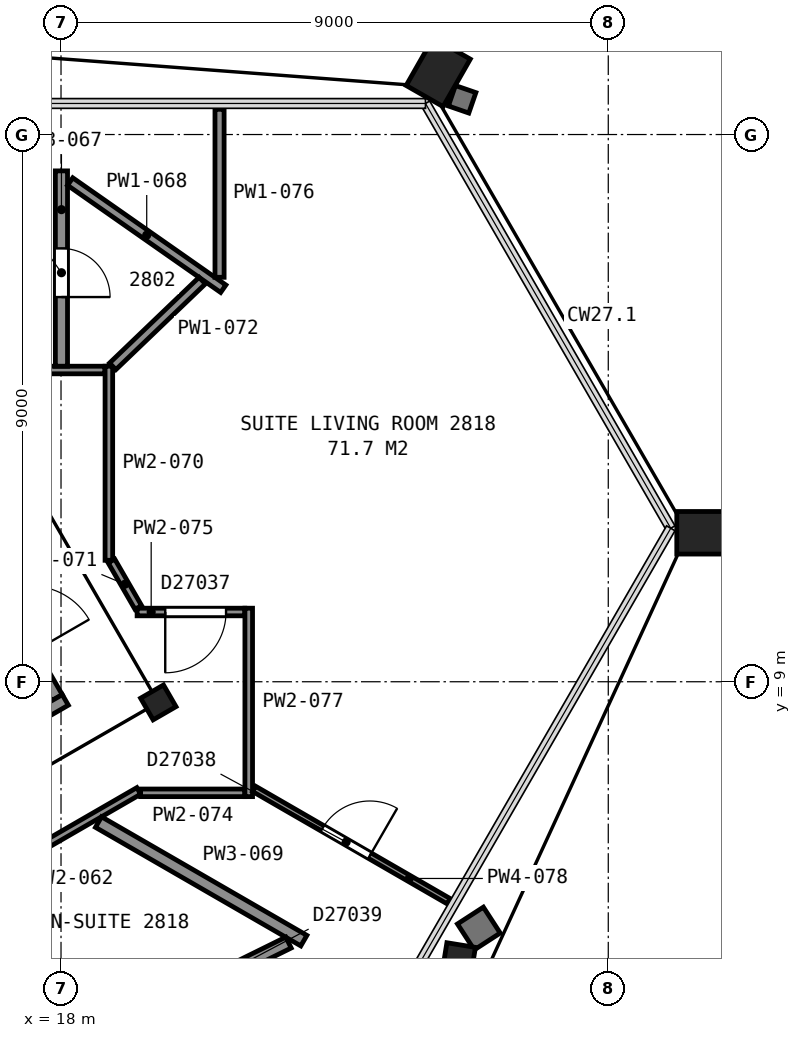
"""IFC4 building model, lengths in metres.
Left out: names, types, materials, properties, quantities, classifications, styles, units other than length and angle.
Written with IfcOpenShell. Run it as: python <this file> out.ifc"""

import sys

from ifc_helpers import new_model, si_unit, direction, frame, frame_2d, origin, origin_2d, place, context, subcontext, project, spatial, rectangle, hollow_rectangle, i_section, extrude, element, fill, save


model = new_model("IFC4")
c1 = context("Model", 3, precision=1e-05, world=origin(), true_north=direction((0.0, 1.0)))
c2 = subcontext(c1, "Body", "Model", "MODEL_VIEW")
j1 = project(units=[si_unit("LENGTHUNIT", "METRE"), si_unit("PLANEANGLEUNIT", "RADIAN")], contexts=[c1])
p1 = place(None, origin())
s1 = spatial("IfcSite", under=j1, at=p1, CompositionType="ELEMENT")
p2 = place(p1, origin())
s2 = spatial("IfcBuilding", under=s1, at=p2, CompositionType="ELEMENT")
p3 = place(p2, frame((0.0, 0.0, 118.0)))
s3 = spatial("IfcBuildingStorey", under=s2, at=p3, CompositionType="ELEMENT", Elevation=118.0)
p4 = place(p3, frame((24.078, 18.805, 0.075), z_axis=(0.108418777699, 0.189698332699, 0.975838055834), x_axis=(0.496777298599, -0.860607291206, 0.112104442017)))
e1 = element("IfcColumn", 1, at=p4, inside=s3, PredefinedType="COLUMN", context=c2, shape_type="SweptSolid", body=[
    extrude(hollow_rectangle(XDim=0.7, YDim=0.9, WallThickness=0.065, at=origin_2d()), origin(), (0.0, 0.0, 1.0), 3.535),
])
p5 = place(p3, frame((24.309, 4.499, 0.045), z_axis=(0.20122090252, -0.032617533776, 0.979002678689), x_axis=(-0.49858735319, -0.863700568811, 0.073701958421)))
e2 = element("IfcColumn", 2, at=p5, inside=s3, PredefinedType="COLUMN", context=c2, shape_type="SweptSolid", body=[
    extrude(i_section(OverallWidth=0.424, OverallDepth=0.475, WebThickness=0.048, FlangeThickness=0.077, FilletRadius=0.015, at=origin_2d()), origin(), (0.0, 0.0, 1.0), 3.585),
])
p6 = place(p3, frame((28.327, 11.45, 0.075), z_axis=(0.216915828776, 0.0, 0.976190310967), x_axis=(0.496943295408, -0.860728700036, -0.11042402856)))
e3 = element("IfcColumn", 3, at=p6, inside=s3, PredefinedType="COLUMN", context=c2, shape_type="SweptSolid", body=[
    extrude(hollow_rectangle(XDim=0.7, YDim=0.9, WallThickness=0.065, at=origin_2d()), origin(), (0.0, 0.0, 1.0), 3.534),
])
p7 = place(p3, frame((19.6, 8.66, 0.0), z_axis=(0.0, 0.0, 1.0), x_axis=(0.5, -0.866025403784, 0.0)))
e4 = element("IfcColumn", 4, at=p7, inside=s3, PredefinedType="COLUMN", context=c2, shape_type="SweptSolid", body=[
    extrude(i_section(OverallWidth=0.411, OverallDepth=0.434, WebThickness=0.036, FlangeThickness=0.057, FilletRadius=0.015, at=origin_2d()), origin(), (0.0, 0.0, 1.0), 3.6),
])
p8 = place(p3, frame((17.934, 8.738, 0.0), z_axis=(0.0, 0.0, 1.0), x_axis=(-0.49998411664, 0.866034573852, 0.0)))
e5 = element("IfcWall", 5, at=p8, inside=s3, PredefinedType="PARTITIONING", context=c2, shape_type="SweptSolid", body=[
    extrude(rectangle(XDim=2.8, YDim=0.2, at=frame_2d((1.4, 0.0))), origin(), (0.0, 0.0, 1.0), 3.35),
])
p9 = place(p8, frame((0.85, 0.0, 0.0)))
e6 = element("IfcOpeningElement", 6, at=p9, cuts=e5, PredefinedType="OPENING", context=c2, shape_type="SweptSolid", body=[
    extrude(rectangle(XDim=1.1, YDim=2.1, at=frame_2d((0.55, 1.05))), frame((0.0, 0.11, 0.0), z_axis=(0.0, -1.0, 0.0), x_axis=(1.0, 0.0, 0.0)), (0.0, 0.0, 1.0), 0.22),
])
p10 = place(p3, frame((7.678, 2.701, 0.0), z_axis=(0.0, 0.0, 1.0), x_axis=(0.866026010844, 0.49999894854, 0.0)))
e7 = element("IfcWall", 7, at=p10, inside=s3, PredefinedType="PARTITIONING", context=c2, shape_type="SweptSolid", body=[
    extrude(rectangle(XDim=12.0, YDim=0.2, at=frame_2d((6.0, 0.0))), origin(), (0.0, 0.0, 1.0), 3.35),
])
p11 = place(p3, frame((15.727, 5.154, 0.0), z_axis=(0.0, 0.0, 1.0), x_axis=(0.865992261418, 0.50005739987, 0.0)))
e8 = element("IfcWall", 8, at=p11, inside=s3, PredefinedType="PARTITIONING", context=c2, shape_type="SweptSolid", body=[
    extrude(rectangle(XDim=4.101, YDim=0.125, at=frame_2d((2.051, 0.0))), origin(), (0.0, 0.0, 1.0), 2.613),
])
p12 = place(p3, frame((15.75, 14.127, 0.0), z_axis=(0.0, 0.0, 1.0), x_axis=(1.0, 0.0, 0.0)))
e9 = element("IfcWall", 9, at=p12, inside=s3, PredefinedType="PARTITIONING", context=c2, shape_type="SweptSolid", body=[
    extrude(rectangle(XDim=2.971, YDim=0.125, at=frame_2d((1.486, 0.0))), origin(), (0.0, 0.0, 1.0), 2.613),
])
p13 = place(p3, frame((16.004, 5.198, 0.0), z_axis=(0.0, 0.0, 1.0), x_axis=(0.866025331845, -0.500000124603, 0.0)))
e10 = element("IfcWall", 10, at=p13, inside=s3, PredefinedType="PARTITIONING", context=c2, shape_type="SweptSolid", body=[
    extrude(rectangle(XDim=7.154, YDim=0.15, at=frame_2d((3.577, 0.0))), origin(), (0.0, 0.0, 1.0), 2.613),
])
p14 = place(p3, frame((18.007, 17.402, 0.0), z_axis=(0.0, 0.0, 1.0), x_axis=(0.0, -1.0, 0.0)))
e11 = element("IfcWall", 11, at=p14, inside=s3, PredefinedType="PARTITIONING", context=c2, shape_type="SweptSolid", body=[
    extrude(rectangle(XDim=3.213, YDim=0.2, at=frame_2d((1.606, 0.0))), origin(), (0.0, 0.0, 1.0), 2.613),
])
p15 = place(p14, frame((1.275, 0.0, 0.0)))
e12 = element("IfcOpeningElement", 12, at=p15, cuts=e11, PredefinedType="OPENING", context=c2, shape_type="SweptSolid", body=[
    extrude(rectangle(XDim=0.8, YDim=2.1, at=frame_2d((0.4, 1.05))), frame((0.0, 0.11, 0.0), z_axis=(0.0, -1.0, 0.0), x_axis=(1.0, 0.0, 0.0)), (0.0, 0.0, 1.0), 0.22),
])
p16 = place(p3, frame((18.15, 17.227, 0.0), z_axis=(0.0, 0.0, 1.0), x_axis=(0.819261773051, -0.573419695526, 0.0)))
e13 = element("IfcWall", 13, at=p16, inside=s3, PredefinedType="PARTITIONING", context=c2, shape_type="SweptSolid", body=[
    extrude(rectangle(XDim=3.073, YDim=0.15, at=frame_2d((1.537, 0.0))), origin(), (0.0, 0.0, 1.0), 2.613),
])
p17 = place(p3, frame((18.616, 6.692, 0.0), z_axis=(0.0, 0.0, 1.0), x_axis=(0.865984367075, -0.500071070931, 0.0)))
e14 = element("IfcWall", 14, at=p17, inside=s3, PredefinedType="PARTITIONING", context=c2, shape_type="SweptSolid", body=[
    extrude(rectangle(XDim=3.9, YDim=0.2, at=frame_2d((1.95, 0.0))), origin(), (0.0, 0.0, 1.0), 2.613),
])
p18 = place(p3, frame((18.787, 10.998, 0.0), z_axis=(0.0, 0.0, 1.0), x_axis=(0.0, 1.0, 0.0)))
e15 = element("IfcWall", 15, at=p18, inside=s3, PredefinedType="PARTITIONING", context=c2, shape_type="SweptSolid", body=[
    extrude(rectangle(XDim=3.192, YDim=0.125, at=frame_2d((1.596, 0.0))), origin(), (0.0, 0.0, 1.0), 2.613),
])
p19 = place(p3, frame((18.83, 10.986, 0.0), z_axis=(0.0, 0.0, 1.0), x_axis=(0.499881837328, -0.866093614288, 0.0)))
e16 = element("IfcWall", 16, at=p19, inside=s3, PredefinedType="PARTITIONING", context=c2, shape_type="SweptSolid", body=[
    extrude(rectangle(XDim=0.884, YDim=0.125, at=frame_2d((0.442, 0.0))), origin(), (0.0, 0.0, 1.0), 2.613),
])
p20 = place(p3, frame((18.85, 14.188, 0.0), z_axis=(0.0, 0.0, 1.0), x_axis=(0.722035565689, 0.69185594012, 0.0)))
e17 = element("IfcWall", 17, at=p20, inside=s3, PredefinedType="PARTITIONING", context=c2, shape_type="SweptSolid", body=[
    extrude(rectangle(XDim=2.039, YDim=0.15, at=frame_2d((1.019, 0.0))), origin(), (0.0, 0.0, 1.0), 2.613),
])
p21 = place(p3, frame((19.245, 3.479, 0.0), z_axis=(0.0, 0.0, 1.0), x_axis=(0.896782684503, 0.44247126096, 0.0)))
e18 = element("IfcWall", 18, at=p21, inside=s3, PredefinedType="PARTITIONING", context=c2, shape_type="SweptSolid", body=[
    extrude(rectangle(XDim=2.784, YDim=0.2, at=frame_2d((1.392, 0.0))), origin(), (0.0, 0.0, 1.0), 2.613),
])
p22 = place(p21, frame((0.993, 0.0, 0.0)))
e19 = element("IfcOpeningElement", 19, at=p22, cuts=e18, PredefinedType="OPENING", context=c2, shape_type="SweptSolid", body=[
    extrude(rectangle(XDim=0.8, YDim=2.1, at=frame_2d((0.4, 1.05))), frame((0.0, 0.11, 0.0), z_axis=(0.0, -1.0, 0.0), x_axis=(1.0, 0.0, 0.0)), (0.0, 0.0, 1.0), 0.22),
])
p23 = place(p3, frame((19.309, 7.173, 0.0), z_axis=(0.0, 0.0, 1.0), x_axis=(1.0, 0.0, 0.0)))
e20 = element("IfcWall", 20, at=p23, inside=s3, PredefinedType="PARTITIONING", context=c2, shape_type="SweptSolid", body=[
    extrude(rectangle(XDim=1.713, YDim=0.125, at=frame_2d((0.856, 0.0))), origin(), (0.0, 0.0, 1.0), 2.613),
])
p24 = place(p3, frame((19.251, 10.147, 0.0), z_axis=(0.0, 0.0, 1.0), x_axis=(1.0, 0.0, 0.0)))
e21 = element("IfcWall", 21, at=p24, inside=s3, PredefinedType="PARTITIONING", context=c2, shape_type="SweptSolid", body=[
    extrude(rectangle(XDim=1.771, YDim=0.125, at=frame_2d((0.885, 0.0))), origin(), (0.0, 0.0, 1.0), 2.613),
])
p25 = place(p24, frame((0.462, 0.0, 0.0)))
e22 = element("IfcOpeningElement", 22, at=p25, cuts=e21, PredefinedType="OPENING", context=c2, shape_type="SweptSolid", body=[
    extrude(rectangle(XDim=1.0, YDim=2.1, at=frame_2d((0.5, 1.05))), frame((0.0, 0.073, 0.0), z_axis=(0.0, -1.0, 0.0), x_axis=(1.0, 0.0, 0.0)), (0.0, 0.0, 1.0), 0.145),
])
p26 = place(p3, frame((20.607, 15.652, 0.0), z_axis=(0.0, 0.0, 1.0), x_axis=(0.0, 1.0, 0.0)))
e23 = element("IfcWall", 23, at=p26, inside=s3, PredefinedType="PARTITIONING", context=c2, shape_type="SweptSolid", body=[
    extrude(rectangle(XDim=2.763, YDim=0.15, at=frame_2d((1.381, 0.0))), origin(), (0.0, 0.0, 1.0), 2.613),
])
p27 = place(p3, frame((21.087, 7.111, 0.0), z_axis=(0.0, 0.0, 1.0), x_axis=(0.0, 1.0, 0.0)))
e24 = element("IfcWall", 24, at=p27, inside=s3, PredefinedType="PARTITIONING", context=c2, shape_type="SweptSolid", body=[
    extrude(rectangle(XDim=3.099, YDim=0.125, at=frame_2d((1.549, 0.0))), origin(), (0.0, 0.0, 1.0), 2.613),
])
p28 = place(p3, frame((24.376, 5.39, 0.0), z_axis=(0.0, 0.0, 1.0), x_axis=(-0.865974401185, 0.500088328689, 0.0)))
e25 = element("IfcWall", 25, at=p28, inside=s3, PredefinedType="PARTITIONING", context=c2, shape_type="SweptSolid", body=[
    extrude(rectangle(XDim=3.697, YDim=0.1, at=frame_2d((1.848, 0.0))), origin(), (0.0, 0.0, 1.0), 2.613),
])
p29 = place(p28, frame((1.498, 0.0, 0.0)))
e26 = element("IfcOpeningElement", 26, at=p29, cuts=e25, PredefinedType="OPENING", context=c2, shape_type="SweptSolid", body=[
    extrude(rectangle(XDim=0.9, YDim=2.1, at=frame_2d((0.45, 1.05))), frame((0.0, 0.06, 0.0), z_axis=(0.0, -1.0, 0.0), x_axis=(1.0, 0.0, 0.0)), (0.0, 0.0, 1.0), 0.12),
])
p30 = place(p15, origin())
e27 = element("IfcDoor", 27, at=p30, inside=s3, OperationType="SINGLE_SWING_RIGHT", PredefinedType="DOOR", context=c2, shape_type="SweptSolid", body=[
    extrude(rectangle(XDim=0.8, YDim=2.1, at=frame_2d((0.4, 1.05))), frame((0.0, 0.025, 0.0), z_axis=(0.0, -1.0, 0.0), x_axis=(1.0, 0.0, 0.0)), (0.0, 0.0, 1.0), 0.05),
])
fill(e12, e27)
p31 = place(p25, origin())
e28 = element("IfcDoor", 28, at=p31, inside=s3, OperationType="SINGLE_SWING_LEFT", PredefinedType="DOOR", context=c2, shape_type="SweptSolid", body=[
    extrude(rectangle(XDim=1.0, YDim=2.1, at=frame_2d((0.5, 1.05))), frame((0.0, 0.025, 0.0), z_axis=(0.0, -1.0, 0.0), x_axis=(1.0, 0.0, 0.0)), (0.0, 0.0, 1.0), 0.05),
])
fill(e22, e28)
p32 = place(p29, origin())
e29 = element("IfcDoor", 29, at=p32, inside=s3, OperationType="SINGLE_SWING_LEFT", PredefinedType="DOOR", context=c2, shape_type="SweptSolid", body=[
    extrude(rectangle(XDim=0.9, YDim=2.1, at=frame_2d((0.45, 1.05))), frame((0.0, 0.025, 0.0), z_axis=(0.0, -1.0, 0.0), x_axis=(1.0, 0.0, 0.0)), (0.0, 0.0, 1.0), 0.05),
])
fill(e26, e29)
save(model, sys.argv[1])
